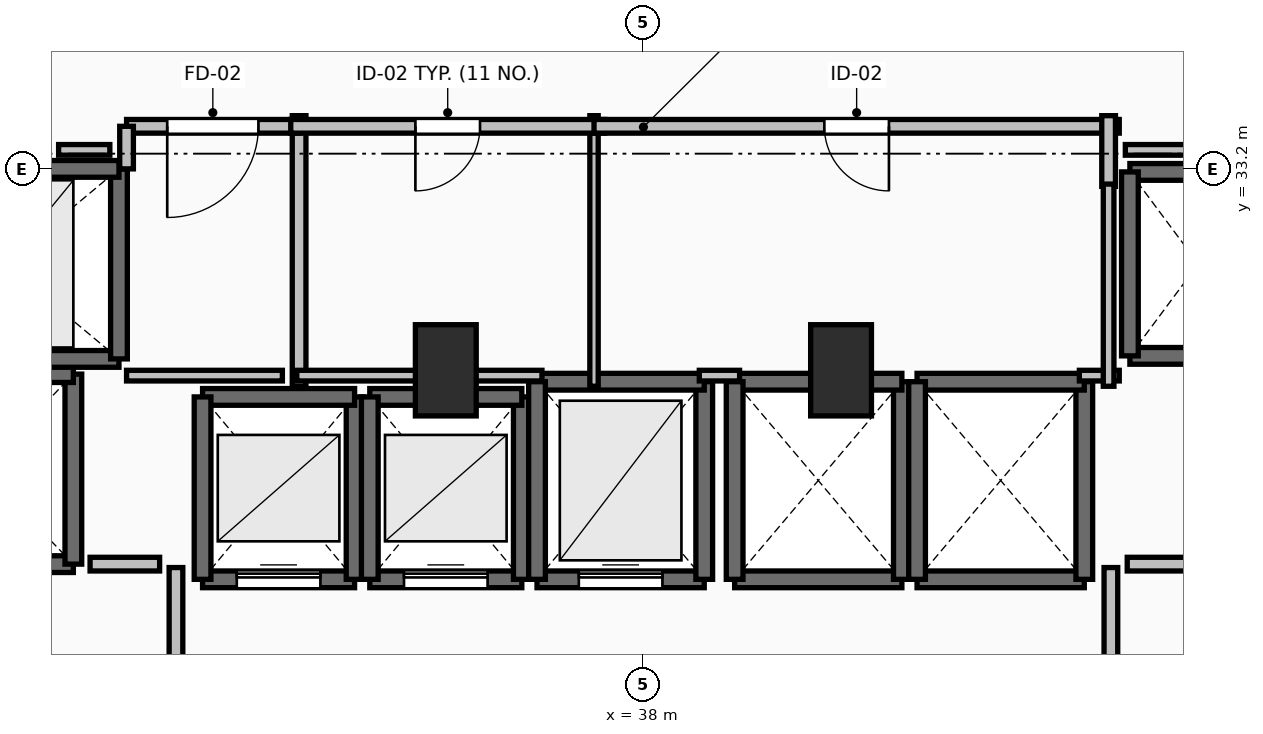
"""IFC4 building model, lengths in metres.
Left out: names, types, materials, properties, quantities, classifications, styles, units other than length and angle.
Written with IfcOpenShell. Run it as: python <this file> out.ifc"""

import sys

from ifc_helpers import new_model, si_unit, direction, frame, frame_2d, origin, origin_2d, place, context, subcontext, project, spatial, rectangle, extrude, element, fill, save


model = new_model("IFC4")
c1 = context("Model", 3, precision=1e-05, world=origin(), true_north=direction((0.0, 1.0)))
c2 = subcontext(c1, "Body", "Model", "MODEL_VIEW")
j1 = project(units=[si_unit("LENGTHUNIT", "METRE"), si_unit("PLANEANGLEUNIT", "RADIAN")], contexts=[c1])
p1 = place(None, origin())
s1 = spatial("IfcSite", under=j1, at=p1, CompositionType="ELEMENT")
p2 = place(p1, origin())
s2 = spatial("IfcBuilding", under=s1, at=p2, CompositionType="ELEMENT")
p3 = place(p2, frame((0.0, 0.0, 38.0)))
s3 = spatial("IfcBuildingStorey", under=s2, at=p3, CompositionType="ELEMENT", Elevation=38.0)
for number, where, z_axis, x_axis in (
    (1, (35.4, 30.55, 0.0), (0.0, 0.0, 1.0), (1.0, 0.0, 0.0)),
    (2, (40.6, 30.55, 0.0), (0.0, 0.0, 1.0), (1.0, 0.0, 0.0)),
):
    element("IfcColumn", number, at=place(p3, frame(where, z_axis=z_axis, x_axis=x_axis)), inside=s3, PredefinedType="PILASTER", context=c2, shape_type="SweptSolid", body=[
        extrude(rectangle(XDim=0.8, YDim=1.2, at=origin_2d()), origin(), (0.0, 0.0, 1.0), 3.5),
    ])
p4 = place(p3, frame((32.2, 27.8, 0.0), z_axis=(0.0, 0.0, 1.0), x_axis=(1.0, 0.0, 0.0)))
e3 = element("IfcWall", 3, at=p4, inside=s3, PredefinedType="SOLIDWALL", context=c2, shape_type="SweptSolid", body=[
    extrude(rectangle(XDim=2.0, YDim=0.22, at=frame_2d((1.0, 0.0))), origin(), (0.0, 0.0, 1.0), 3.24),
])
p5 = place(p4, frame((0.45, 0.0, 0.0)))
e4 = element("IfcOpeningElement", 4, at=p5, cuts=e3, PredefinedType="OPENING", context=c2, shape_type="SweptSolid", body=[
    extrude(rectangle(XDim=1.1, YDim=2.2, at=frame_2d((0.55, 1.1))), frame((0.0, 0.125, 0.0), z_axis=(0.0, -1.0, 0.0), x_axis=(1.0, 0.0, 0.0)), (0.0, 0.0, 1.0), 0.25),
])
p6 = place(p3, frame((34.2, 27.8, 0.0), z_axis=(0.0, 0.0, 1.0), x_axis=(0.0, 1.0, 0.0)))
e5 = element("IfcWall", 5, at=p6, inside=s3, PredefinedType="SOLIDWALL", context=c2, shape_type="SweptSolid", body=[
    extrude(rectangle(XDim=2.4, YDim=0.22, at=frame_2d((1.2, 0.0))), origin(), (0.0, 0.0, 1.0), 3.24),
])
p7 = place(p3, frame((34.2, 30.2, 0.0), z_axis=(0.0, 0.0, 1.0), x_axis=(-1.0, 0.0, 0.0)))
e6 = element("IfcWall", 6, at=p7, inside=s3, PredefinedType="SOLIDWALL", context=c2, shape_type="SweptSolid", body=[
    extrude(rectangle(XDim=2.0, YDim=0.22, at=frame_2d((1.0, 0.0))), origin(), (0.0, 0.0, 1.0), 3.24),
])
p8 = place(p3, frame((32.2, 30.2, 0.0), z_axis=(0.0, 0.0, 1.0), x_axis=(0.0, -1.0, 0.0)))
e7 = element("IfcWall", 7, at=p8, inside=s3, PredefinedType="SOLIDWALL", context=c2, shape_type="SweptSolid", body=[
    extrude(rectangle(XDim=2.4, YDim=0.22, at=frame_2d((1.2, 0.0))), origin(), (0.0, 0.0, 1.0), 3.24),
])
p9 = place(p3, frame((34.4, 27.8, 0.0), z_axis=(0.0, 0.0, 1.0), x_axis=(1.0, 0.0, 0.0)))
e8 = element("IfcWall", 8, at=p9, inside=s3, PredefinedType="SOLIDWALL", context=c2, shape_type="SweptSolid", body=[
    extrude(rectangle(XDim=2.0, YDim=0.22, at=frame_2d((1.0, 0.0))), origin(), (0.0, 0.0, 1.0), 3.24),
])
p10 = place(p9, frame((0.45, 0.0, 0.0)))
e9 = element("IfcOpeningElement", 9, at=p10, cuts=e8, PredefinedType="OPENING", context=c2, shape_type="SweptSolid", body=[
    extrude(rectangle(XDim=1.1, YDim=2.2, at=frame_2d((0.55, 1.1))), frame((0.0, 0.125, 0.0), z_axis=(0.0, -1.0, 0.0), x_axis=(1.0, 0.0, 0.0)), (0.0, 0.0, 1.0), 0.25),
])
p11 = place(p3, frame((36.4, 27.8, 0.0), z_axis=(0.0, 0.0, 1.0), x_axis=(0.0, 1.0, 0.0)))
e10 = element("IfcWall", 10, at=p11, inside=s3, PredefinedType="SOLIDWALL", context=c2, shape_type="SweptSolid", body=[
    extrude(rectangle(XDim=2.4, YDim=0.22, at=frame_2d((1.2, 0.0))), origin(), (0.0, 0.0, 1.0), 3.24),
])
p12 = place(p3, frame((36.4, 30.2, 0.0), z_axis=(0.0, 0.0, 1.0), x_axis=(-1.0, 0.0, 0.0)))
e11 = element("IfcWall", 11, at=p12, inside=s3, PredefinedType="SOLIDWALL", context=c2, shape_type="SweptSolid", body=[
    extrude(rectangle(XDim=2.0, YDim=0.22, at=frame_2d((1.0, 0.0))), origin(), (0.0, 0.0, 1.0), 3.24),
])
p13 = place(p3, frame((34.4, 30.2, 0.0), z_axis=(0.0, 0.0, 1.0), x_axis=(0.0, -1.0, 0.0)))
e12 = element("IfcWall", 12, at=p13, inside=s3, PredefinedType="SOLIDWALL", context=c2, shape_type="SweptSolid", body=[
    extrude(rectangle(XDim=2.4, YDim=0.22, at=frame_2d((1.2, 0.0))), origin(), (0.0, 0.0, 1.0), 3.24),
])
p14 = place(p3, frame((36.6, 27.8, 0.0), z_axis=(0.0, 0.0, 1.0), x_axis=(1.0, 0.0, 0.0)))
e13 = element("IfcWall", 13, at=p14, inside=s3, PredefinedType="SOLIDWALL", context=c2, shape_type="SweptSolid", body=[
    extrude(rectangle(XDim=2.2, YDim=0.22, at=frame_2d((1.1, 0.0))), origin(), (0.0, 0.0, 1.0), 3.24),
])
p15 = place(p14, frame((0.55, 0.0, 0.0)))
e14 = element("IfcOpeningElement", 14, at=p15, cuts=e13, PredefinedType="OPENING", context=c2, shape_type="SweptSolid", body=[
    extrude(rectangle(XDim=1.1, YDim=2.2, at=frame_2d((0.55, 1.1))), frame((0.0, 0.125, 0.0), z_axis=(0.0, -1.0, 0.0), x_axis=(1.0, 0.0, 0.0)), (0.0, 0.0, 1.0), 0.25),
])
p16 = place(p3, frame((38.8, 27.8, 0.0), z_axis=(0.0, 0.0, 1.0), x_axis=(0.0, 1.0, 0.0)))
e15 = element("IfcWall", 15, at=p16, inside=s3, PredefinedType="SOLIDWALL", context=c2, shape_type="SweptSolid", body=[
    extrude(rectangle(XDim=2.6, YDim=0.22, at=frame_2d((1.3, 0.0))), origin(), (0.0, 0.0, 1.0), 3.24),
])
p17 = place(p3, frame((38.8, 30.4, 0.0), z_axis=(0.0, 0.0, 1.0), x_axis=(-1.0, 0.0, 0.0)))
e16 = element("IfcWall", 16, at=p17, inside=s3, PredefinedType="SOLIDWALL", context=c2, shape_type="SweptSolid", body=[
    extrude(rectangle(XDim=2.2, YDim=0.22, at=frame_2d((1.1, 0.0))), origin(), (0.0, 0.0, 1.0), 3.24),
])
p18 = place(p3, frame((36.6, 30.4, 0.0), z_axis=(0.0, 0.0, 1.0), x_axis=(0.0, -1.0, 0.0)))
e17 = element("IfcWall", 17, at=p18, inside=s3, PredefinedType="SOLIDWALL", context=c2, shape_type="SweptSolid", body=[
    extrude(rectangle(XDim=2.6, YDim=0.22, at=frame_2d((1.3, 0.0))), origin(), (0.0, 0.0, 1.0), 3.24),
])
p19 = place(p3, frame((39.2, 27.8, 0.0), z_axis=(0.0, 0.0, 1.0), x_axis=(1.0, 0.0, 0.0)))
e18 = element("IfcWall", 18, at=p19, inside=s3, PredefinedType="SOLIDWALL", context=c2, shape_type="SweptSolid", body=[
    extrude(rectangle(XDim=2.2, YDim=0.22, at=frame_2d((1.1, 0.0))), origin(), (0.0, 0.0, 1.0), 3.24),
])
p20 = place(p3, frame((41.4, 27.8, 0.0), z_axis=(0.0, 0.0, 1.0), x_axis=(0.0, 1.0, 0.0)))
e19 = element("IfcWall", 19, at=p20, inside=s3, PredefinedType="SOLIDWALL", context=c2, shape_type="SweptSolid", body=[
    extrude(rectangle(XDim=2.6, YDim=0.22, at=frame_2d((1.3, 0.0))), origin(), (0.0, 0.0, 1.0), 3.24),
])
p21 = place(p3, frame((41.4, 30.4, 0.0), z_axis=(0.0, 0.0, 1.0), x_axis=(-1.0, 0.0, 0.0)))
e20 = element("IfcWall", 20, at=p21, inside=s3, PredefinedType="SOLIDWALL", context=c2, shape_type="SweptSolid", body=[
    extrude(rectangle(XDim=2.2, YDim=0.22, at=frame_2d((1.1, 0.0))), origin(), (0.0, 0.0, 1.0), 3.24),
])
p22 = place(p3, frame((39.2, 30.4, 0.0), z_axis=(0.0, 0.0, 1.0), x_axis=(0.0, -1.0, 0.0)))
e21 = element("IfcWall", 21, at=p22, inside=s3, PredefinedType="SOLIDWALL", context=c2, shape_type="SweptSolid", body=[
    extrude(rectangle(XDim=2.6, YDim=0.22, at=frame_2d((1.3, 0.0))), origin(), (0.0, 0.0, 1.0), 3.24),
])
p23 = place(p3, frame((41.6, 27.8, 0.0), z_axis=(0.0, 0.0, 1.0), x_axis=(1.0, 0.0, 0.0)))
e22 = element("IfcWall", 22, at=p23, inside=s3, PredefinedType="SOLIDWALL", context=c2, shape_type="SweptSolid", body=[
    extrude(rectangle(XDim=2.2, YDim=0.22, at=frame_2d((1.1, 0.0))), origin(), (0.0, 0.0, 1.0), 3.24),
])
p24 = place(p3, frame((43.8, 27.8, 0.0), z_axis=(0.0, 0.0, 1.0), x_axis=(0.0, 1.0, 0.0)))
e23 = element("IfcWall", 23, at=p24, inside=s3, PredefinedType="SOLIDWALL", context=c2, shape_type="SweptSolid", body=[
    extrude(rectangle(XDim=2.6, YDim=0.22, at=frame_2d((1.3, 0.0))), origin(), (0.0, 0.0, 1.0), 3.24),
])
p25 = place(p3, frame((43.8, 30.4, 0.0), z_axis=(0.0, 0.0, 1.0), x_axis=(-1.0, 0.0, 0.0)))
e24 = element("IfcWall", 24, at=p25, inside=s3, PredefinedType="SOLIDWALL", context=c2, shape_type="SweptSolid", body=[
    extrude(rectangle(XDim=2.2, YDim=0.22, at=frame_2d((1.1, 0.0))), origin(), (0.0, 0.0, 1.0), 3.24),
])
p26 = place(p3, frame((41.6, 30.4, 0.0), z_axis=(0.0, 0.0, 1.0), x_axis=(0.0, -1.0, 0.0)))
e25 = element("IfcWall", 25, at=p26, inside=s3, PredefinedType="SOLIDWALL", context=c2, shape_type="SweptSolid", body=[
    extrude(rectangle(XDim=2.6, YDim=0.22, at=frame_2d((1.3, 0.0))), origin(), (0.0, 0.0, 1.0), 3.24),
])
for number, where, z_axis, x_axis in (
    (26, (44.4, 30.74, 0.0), (0.0, 0.0, 1.0), (1.0, 0.0, 0.0)),
    (27, (46.2, 33.16, 0.0), (0.0, 0.0, 1.0), (-1.0, 0.0, 0.0)),
):
    element("IfcWall", number, at=place(p3, frame(where, z_axis=z_axis, x_axis=x_axis)), inside=s3, PredefinedType="SOLIDWALL", context=c2, shape_type="SweptSolid", body=[
        extrude(rectangle(XDim=1.8, YDim=0.22, at=frame_2d((0.9, 0.0))), origin(), (0.0, 0.0, 1.0), 3.24),
    ])
p27 = place(p3, frame((44.4, 33.16, 0.0), z_axis=(0.0, 0.0, 1.0), x_axis=(0.0, -1.0, 0.0)))
e28 = element("IfcWall", 28, at=p27, inside=s3, PredefinedType="SOLIDWALL", context=c2, shape_type="SweptSolid", body=[
    extrude(rectangle(XDim=2.42, YDim=0.22, at=frame_2d((1.21, 0.0))), origin(), (0.0, 0.0, 1.0), 3.24),
])
p28 = place(p3, frame((28.1, 28.0, 0.0), z_axis=(0.0, 0.0, 1.0), x_axis=(1.0, 0.0, 0.0)))
e29 = element("IfcWall", 29, at=p28, inside=s3, PredefinedType="SHEAR", context=c2, shape_type="SweptSolid", body=[
    extrude(rectangle(XDim=2.4, YDim=0.22, at=frame_2d((1.2, 0.0))), origin(), (0.0, 0.0, 1.0), 3.24),
])
p29 = place(p28, frame((0.6, 0.0, 0.0)))
e30 = element("IfcOpeningElement", 30, at=p29, cuts=e29, PredefinedType="OPENING", context=c2, shape_type="SweptSolid", body=[
    extrude(rectangle(XDim=1.2, YDim=2.2, at=frame_2d((0.6, 1.1))), frame((0.0, 0.125, 0.0), z_axis=(0.0, -1.0, 0.0), x_axis=(1.0, 0.0, 0.0)), (0.0, 0.0, 1.0), 0.25),
])
p30 = place(p3, frame((30.5, 28.0, 0.0), z_axis=(0.0, 0.0, 1.0), x_axis=(0.0, 1.0, 0.0)))
e31 = element("IfcWall", 31, at=p30, inside=s3, PredefinedType="SHEAR", context=c2, shape_type="SweptSolid", body=[
    extrude(rectangle(XDim=2.5, YDim=0.22, at=frame_2d((1.25, 0.0))), origin(), (0.0, 0.0, 1.0), 3.24),
])
p31 = place(p3, frame((30.5, 30.5, 0.0), z_axis=(0.0, 0.0, 1.0), x_axis=(-1.0, 0.0, 0.0)))
e32 = element("IfcWall", 32, at=p31, inside=s3, PredefinedType="SHEAR", context=c2, shape_type="SweptSolid", body=[
    extrude(rectangle(XDim=2.4, YDim=0.22, at=frame_2d((1.2, 0.0))), origin(), (0.0, 0.0, 1.0), 3.24),
])
p32 = place(p3, frame((28.1, 30.7, 0.0), z_axis=(0.0, 0.0, 1.0), x_axis=(1.0, 0.0, 0.0)))
e33 = element("IfcWall", 33, at=p32, inside=s3, PredefinedType="SOLIDWALL", context=c2, shape_type="SweptSolid", body=[
    extrude(rectangle(XDim=3.0, YDim=0.22, at=frame_2d((1.5, 0.0))), origin(), (0.0, 0.0, 1.0), 3.24),
])
p33 = place(p3, frame((31.1, 30.7, 0.0), z_axis=(0.0, 0.0, 1.0), x_axis=(0.0, 1.0, 0.0)))
e34 = element("IfcWall", 34, at=p33, inside=s3, PredefinedType="SOLIDWALL", context=c2, shape_type="SweptSolid", body=[
    extrude(rectangle(XDim=2.5, YDim=0.22, at=frame_2d((1.25, 0.0))), origin(), (0.0, 0.0, 1.0), 3.24),
])
p34 = place(p3, frame((31.1, 33.2, 0.0), z_axis=(0.0, 0.0, 1.0), x_axis=(-1.0, 0.0, 0.0)))
e35 = element("IfcWall", 35, at=p34, inside=s3, PredefinedType="SOLIDWALL", context=c2, shape_type="SweptSolid", body=[
    extrude(rectangle(XDim=3.0, YDim=0.22, at=frame_2d((1.5, 0.0))), origin(), (0.0, 0.0, 1.0), 3.24),
])
p35 = place(p34, frame((0.9, 0.0, 0.0)))
e36 = element("IfcOpeningElement", 36, at=p35, cuts=e35, PredefinedType="OPENING", context=c2, shape_type="SweptSolid", body=[
    extrude(rectangle(XDim=1.2, YDim=2.2, at=frame_2d((0.6, 1.1))), frame((0.0, 0.125, 0.0), z_axis=(0.0, -1.0, 0.0), x_axis=(1.0, 0.0, 0.0)), (0.0, 0.0, 1.0), 0.25),
])
p36 = place(p3, frame((31.85, 24.045, 0.0), z_axis=(0.0, 0.0, 1.0), x_axis=(0.0, 1.0, 0.0)))
e37 = element("IfcWall", 37, at=p36, inside=s3, PredefinedType="PARTITIONING", context=c2, shape_type="SweptSolid", body=[
    extrude(rectangle(XDim=3.91, YDim=0.18, at=frame_2d((1.955, 0.0))), origin(), (0.0, 0.0, 1.0), 3.24),
])
p37 = place(p36, frame((1.355, 0.0, 0.0)))
e38 = element("IfcOpeningElement", 38, at=p37, cuts=e37, PredefinedType="OPENING", context=c2, shape_type="SweptSolid", body=[
    extrude(rectangle(XDim=1.2, YDim=2.15, at=frame_2d((0.6, 1.075))), frame((0.0, 0.105, 0.0), z_axis=(0.0, -1.0, 0.0), x_axis=(1.0, 0.0, 0.0)), (0.0, 0.0, 1.0), 0.21),
])
p38 = place(p3, frame((44.15, 27.955, 0.0), z_axis=(0.0, 0.0, 1.0), x_axis=(0.0, -1.0, 0.0)))
e39 = element("IfcWall", 39, at=p38, inside=s3, PredefinedType="PARTITIONING", context=c2, shape_type="SweptSolid", body=[
    extrude(rectangle(XDim=3.91, YDim=0.18, at=frame_2d((1.955, 0.0))), origin(), (0.0, 0.0, 1.0), 3.24),
])
p39 = place(p38, frame((1.355, 0.0, 0.0)))
e40 = element("IfcOpeningElement", 40, at=p39, cuts=e39, PredefinedType="OPENING", context=c2, shape_type="SweptSolid", body=[
    extrude(rectangle(XDim=1.2, YDim=2.15, at=frame_2d((0.6, 1.075))), frame((0.0, 0.105, 0.0), z_axis=(0.0, -1.0, 0.0), x_axis=(1.0, 0.0, 0.0)), (0.0, 0.0, 1.0), 0.21),
])
p40 = place(p3, frame((33.47, 30.34, 0.0), z_axis=(0.0, 0.0, 1.0), x_axis=(0.0, 1.0, 0.0)))
e41 = element("IfcWall", 41, at=p40, inside=s3, PredefinedType="PARTITIONING", context=c2, shape_type="SweptSolid", body=[
    extrude(rectangle(XDim=3.56, YDim=0.18, at=frame_2d((1.78, 0.0))), origin(), (0.0, 0.0, 1.0), 3.24),
])
p41 = place(p3, frame((33.47, 33.76, 0.0), z_axis=(0.0, 0.0, 1.0), x_axis=(-1.0, 0.0, 0.0)))
e42 = element("IfcWall", 42, at=p41, inside=s3, PredefinedType="PARTITIONING", context=c2, shape_type="SweptSolid", body=[
    extrude(rectangle(XDim=2.27, YDim=0.18, at=frame_2d((1.135, 0.0))), origin(), (0.0, 0.0, 1.0), 3.24),
])
p42 = place(p41, frame((0.535, 0.0, 0.0)))
e43 = element("IfcOpeningElement", 43, at=p42, cuts=e42, PredefinedType="OPENING", context=c2, shape_type="SweptSolid", body=[
    extrude(rectangle(XDim=1.2, YDim=2.15, at=frame_2d((0.6, 1.075))), frame((0.0, 0.105, 0.0), z_axis=(0.0, -1.0, 0.0), x_axis=(1.0, 0.0, 0.0)), (0.0, 0.0, 1.0), 0.21),
])
p43 = place(p3, frame((31.2, 33.76, 0.0), z_axis=(0.0, 0.0, 1.0), x_axis=(0.0, -1.0, 0.0)))
e44 = element("IfcWall", 44, at=p43, inside=s3, PredefinedType="PARTITIONING", context=c2, shape_type="SweptSolid", body=[
    extrude(rectangle(XDim=0.56, YDim=0.18, at=frame_2d((0.28, 0.0))), origin(), (0.0, 0.0, 1.0), 3.24),
])
p44 = place(p3, frame((37.35, 30.34, 0.0), z_axis=(0.0, 0.0, 1.0), x_axis=(0.0, 1.0, 0.0)))
e45 = element("IfcWall", 45, at=p44, inside=s3, PredefinedType="PARTITIONING", context=c2, shape_type="SweptSolid", body=[
    extrude(rectangle(XDim=3.56, YDim=0.11, at=frame_2d((1.78, 0.0))), origin(), (0.0, 0.0, 1.0), 2.432),
])
p45 = place(p3, frame((37.49, 33.76, 0.0), z_axis=(0.0, 0.0, 1.0), x_axis=(-1.0, 0.0, 0.0)))
e46 = element("IfcWall", 46, at=p45, inside=s3, PredefinedType="PARTITIONING", context=c2, shape_type="SweptSolid", body=[
    extrude(rectangle(XDim=4.13, YDim=0.18, at=frame_2d((2.065, 0.0))), origin(), (0.0, 0.0, 1.0), 3.24),
])
p46 = place(p45, frame((1.64, 0.0, 0.0)))
e47 = element("IfcOpeningElement", 47, at=p46, cuts=e46, PredefinedType="OPENING", context=c2, shape_type="SweptSolid", body=[
    extrude(rectangle(XDim=0.85, YDim=2.1, at=frame_2d((0.425, 1.05))), frame((0.0, 0.105, 0.0), z_axis=(0.0, -1.0, 0.0), x_axis=(1.0, 0.0, 0.0)), (0.0, 0.0, 1.0), 0.21),
])
p47 = place(p3, frame((44.26, 33.76, 0.0), z_axis=(0.0, 0.0, 1.0), x_axis=(-1.0, 0.0, 0.0)))
e48 = element("IfcWall", 48, at=p47, inside=s3, PredefinedType="PARTITIONING", context=c2, shape_type="SweptSolid", body=[
    extrude(rectangle(XDim=6.91, YDim=0.18, at=frame_2d((3.455, 0.0))), origin(), (0.0, 0.0, 1.0), 3.24),
])
p48 = place(p47, frame((3.03, 0.0, 0.0)))
e49 = element("IfcOpeningElement", 49, at=p48, cuts=e48, PredefinedType="OPENING", context=c2, shape_type="SweptSolid", body=[
    extrude(rectangle(XDim=0.85, YDim=2.1, at=frame_2d((0.425, 1.05))), frame((0.0, 0.105, 0.0), z_axis=(0.0, -1.0, 0.0), x_axis=(1.0, 0.0, 0.0)), (0.0, 0.0, 1.0), 0.21),
])
p49 = place(p3, frame((44.12, 32.97, 0.0), z_axis=(0.0, 0.0, 1.0), x_axis=(0.0, 1.0, 0.0)))
e50 = element("IfcWall", 50, at=p49, inside=s3, PredefinedType="PARTITIONING", context=c2, shape_type="SweptSolid", body=[
    extrude(rectangle(XDim=0.93, YDim=0.18, at=frame_2d((0.465, 0.0))), origin(), (0.0, 0.0, 1.0), 3.24),
])
for number, where, z_axis, x_axis in (
    (51, (31.635, 28.0, 0.0), (0.0, 0.0, 1.0), (-1.0, 0.0, 0.0)),
    (52, (45.28, 28.0, 0.0), (0.0, 0.0, 1.0), (-1.0, 0.0, 0.0)),
):
    element("IfcWall", number, at=place(p3, frame(where, z_axis=z_axis, x_axis=x_axis)), inside=s3, PredefinedType="PARTITIONING", context=c2, shape_type="SweptSolid", body=[
        extrude(rectangle(XDim=0.915, YDim=0.18, at=frame_2d((0.458, 0.0))), origin(), (0.0, 0.0, 1.0), 3.24),
    ])
p50 = place(p3, frame((31.2, 30.48, 0.0), z_axis=(0.0, 0.0, 1.0), x_axis=(1.0, 0.0, 0.0)))
e53 = element("IfcWall", 53, at=p50, inside=s3, PredefinedType="PARTITIONING", context=c2, shape_type="SweptSolid", body=[
    extrude(rectangle(XDim=2.05, YDim=0.14, at=frame_2d((1.025, 0.0))), origin(), (0.0, 0.0, 1.0), 3.24),
])
p51 = place(p3, frame((33.44, 30.48, 0.0), z_axis=(0.0, 0.0, 1.0), x_axis=(1.0, 0.0, 0.0)))
e54 = element("IfcWall", 54, at=p51, inside=s3, PredefinedType="PARTITIONING", context=c2, shape_type="SweptSolid", body=[
    extrude(rectangle(XDim=3.225, YDim=0.14, at=frame_2d((1.613, 0.0))), origin(), (0.0, 0.0, 1.0), 2.432),
])
p52 = place(p3, frame((38.735, 30.48, 0.0), z_axis=(0.0, 0.0, 1.0), x_axis=(1.0, 0.0, 0.0)))
e55 = element("IfcWall", 55, at=p52, inside=s3, PredefinedType="PARTITIONING", context=c2, shape_type="SweptSolid", body=[
    extrude(rectangle(XDim=0.53, YDim=0.14, at=frame_2d((0.265, 0.0))), origin(), (0.0, 0.0, 1.0), 2.432),
])
p53 = place(p3, frame((43.735, 30.48, 0.0), z_axis=(0.0, 0.0, 1.0), x_axis=(1.0, 0.0, 0.0)))
e56 = element("IfcWall", 56, at=p53, inside=s3, PredefinedType="PARTITIONING", context=c2, shape_type="SweptSolid", body=[
    extrude(rectangle(XDim=0.525, YDim=0.14, at=frame_2d((0.262, 0.0))), origin(), (0.0, 0.0, 1.0), 3.24),
])
p54 = place(p3, frame((44.12, 30.34, 0.0), z_axis=(0.0, 0.0, 1.0), x_axis=(0.0, 1.0, 0.0)))
e57 = element("IfcWall", 57, at=p54, inside=s3, PredefinedType="PARTITIONING", context=c2, shape_type="SweptSolid", body=[
    extrude(rectangle(XDim=2.66, YDim=0.14, at=frame_2d((1.33, 0.0))), origin(), (0.0, 0.0, 1.0), 3.24),
])
p55 = place(p3, frame((44.34, 33.45, 0.0), z_axis=(0.0, 0.0, 1.0), x_axis=(1.0, 0.0, 0.0)))
e58 = element("IfcWall", 58, at=p55, inside=s3, PredefinedType="PARTITIONING", context=c2, shape_type="SweptSolid", body=[
    extrude(rectangle(XDim=4.21, YDim=0.14, at=frame_2d((2.105, 0.0))), origin(), (0.0, 0.0, 1.0), 2.432),
])
p56 = place(p3, frame((30.306, 33.45, 0.0), z_axis=(0.0, 0.0, 1.0), x_axis=(1.0, 0.0, 0.0)))
e59 = element("IfcWall", 59, at=p56, inside=s3, PredefinedType="PARTITIONING", context=c2, shape_type="SweptSolid", body=[
    extrude(rectangle(XDim=0.674, YDim=0.14, at=frame_2d((0.337, 0.0))), origin(), (0.0, 0.0, 1.0), 3.24),
])
p57 = place(p5, origin())
e60 = element("IfcDoor", 60, at=p57, inside=s3, OperationType="SLIDING_TO_LEFT", PredefinedType="DOOR", context=c2, shape_type="SweptSolid", body=[
    extrude(rectangle(XDim=1.1, YDim=2.2, at=frame_2d((0.55, 1.1))), frame((0.0, 0.025, 0.0), z_axis=(0.0, -1.0, 0.0), x_axis=(1.0, 0.0, 0.0)), (0.0, 0.0, 1.0), 0.05),
])
fill(e4, e60)
p58 = place(p10, origin())
e61 = element("IfcDoor", 61, at=p58, inside=s3, OperationType="SLIDING_TO_LEFT", PredefinedType="DOOR", context=c2, shape_type="SweptSolid", body=[
    extrude(rectangle(XDim=1.1, YDim=2.2, at=frame_2d((0.55, 1.1))), frame((0.0, 0.025, 0.0), z_axis=(0.0, -1.0, 0.0), x_axis=(1.0, 0.0, 0.0)), (0.0, 0.0, 1.0), 0.05),
])
fill(e9, e61)
p59 = place(p15, origin())
e62 = element("IfcDoor", 62, at=p59, inside=s3, OperationType="SLIDING_TO_LEFT", PredefinedType="DOOR", context=c2, shape_type="SweptSolid", body=[
    extrude(rectangle(XDim=1.1, YDim=2.2, at=frame_2d((0.55, 1.1))), frame((0.0, 0.025, 0.0), z_axis=(0.0, -1.0, 0.0), x_axis=(1.0, 0.0, 0.0)), (0.0, 0.0, 1.0), 0.05),
])
fill(e14, e62)
p60 = place(p42, origin())
e63 = element("IfcDoor", 63, at=p60, inside=s3, OperationType="SINGLE_SWING_RIGHT", PredefinedType="DOOR", context=c2, shape_type="SweptSolid", body=[
    extrude(rectangle(XDim=1.2, YDim=2.15, at=frame_2d((0.6, 1.075))), frame((0.0, 0.025, 0.0), z_axis=(0.0, -1.0, 0.0), x_axis=(1.0, 0.0, 0.0)), (0.0, 0.0, 1.0), 0.05),
])
fill(e43, e63)
p61 = place(p46, origin())
e64 = element("IfcDoor", 64, at=p61, inside=s3, OperationType="SINGLE_SWING_RIGHT", PredefinedType="DOOR", context=c2, shape_type="SweptSolid", body=[
    extrude(rectangle(XDim=0.85, YDim=2.1, at=frame_2d((0.425, 1.05))), frame((0.0, 0.025, 0.0), z_axis=(0.0, -1.0, 0.0), x_axis=(1.0, 0.0, 0.0)), (0.0, 0.0, 1.0), 0.05),
])
fill(e47, e64)
p62 = place(p48, origin())
e65 = element("IfcDoor", 65, at=p62, inside=s3, OperationType="SINGLE_SWING_LEFT", PredefinedType="DOOR", context=c2, shape_type="SweptSolid", body=[
    extrude(rectangle(XDim=0.85, YDim=2.1, at=frame_2d((0.425, 1.05))), frame((0.0, 0.025, 0.0), z_axis=(0.0, -1.0, 0.0), x_axis=(1.0, 0.0, 0.0)), (0.0, 0.0, 1.0), 0.05),
])
fill(e49, e65)
save(model, sys.argv[1])
